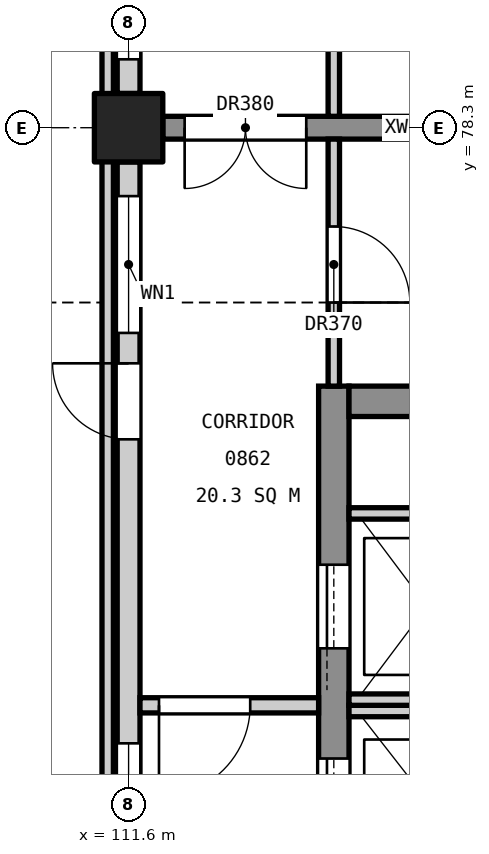
"""IFC4 building model, lengths in metres.
Left out: names, types, materials, properties, quantities, classifications, styles, units other than length and angle.
Written with IfcOpenShell. Run it as: python <this file> out.ifc"""

import sys

from ifc_helpers import new_model, si_unit, direction, frame, frame_2d, origin, origin_2d, place, context, subcontext, project, spatial, rectangle, extrude, element, fill, save


model = new_model("IFC4")
c1 = context("Model", 3, precision=1e-05, world=origin(), true_north=direction((0.0, 1.0)))
c2 = subcontext(c1, "Body", "Model", "MODEL_VIEW")
j1 = project(units=[si_unit("LENGTHUNIT", "METRE"), si_unit("PLANEANGLEUNIT", "RADIAN")], contexts=[c1])
p1 = place(None, origin())
s1 = spatial("IfcSite", under=j1, at=p1, CompositionType="ELEMENT")
p2 = place(p1, origin())
s2 = spatial("IfcBuilding", under=s1, at=p2, CompositionType="ELEMENT")
p3 = place(p2, frame((0.0, 0.0, 41.4)))
s3 = spatial("IfcBuildingStorey", under=s2, at=p3, CompositionType="ELEMENT", Elevation=41.4)
p4 = place(p3, frame((111.6, 78.3, 0.0), z_axis=(0.0, 0.0, 1.0), x_axis=(1.0, 0.0, 0.0)))
e1 = element("IfcColumn", 1, at=p4, inside=s3, PredefinedType="COLUMN", context=c2, shape_type="SweptSolid", body=[
    extrude(rectangle(XDim=0.9, YDim=0.9, at=origin_2d()), origin(), (0.0, 0.0, 1.0), 4.8),
])
p5 = place(p3, frame((114.3, 60.1, 0.0), z_axis=(0.0, 0.0, 1.0), x_axis=(0.0, 1.0, 0.0)))
e2 = element("IfcWall", 2, at=p5, inside=s3, PredefinedType="SHEAR", context=c2, shape_type="SweptSolid", body=[
    extrude(rectangle(XDim=14.8, YDim=0.4, at=frame_2d((7.4, 0.0))), origin(), (0.0, 0.0, 1.0), 4.55),
])
p6 = place(p5, frame((0.5, 0.0, 0.0)))
e3 = element("IfcOpeningElement", 3, at=p6, cuts=e2, PredefinedType="OPENING", context=c2, shape_type="SweptSolid", body=[
    extrude(rectangle(XDim=1.4, YDim=2.1, at=frame_2d((0.7, 1.05))), frame((0.0, 0.21, 0.0), z_axis=(0.0, -1.0, 0.0), x_axis=(1.0, 0.0, 0.0)), (0.0, 0.0, 1.0), 0.42),
])
p7 = place(p5, frame((8.8, 0.0, 0.0)))
e4 = element("IfcOpeningElement", 4, at=p7, cuts=e2, PredefinedType="OPENING", context=c2, shape_type="SweptSolid", body=[
    extrude(rectangle(XDim=1.1, YDim=2.1, at=frame_2d((0.55, 1.05))), frame((0.0, 0.21, 0.0), z_axis=(0.0, -1.0, 0.0), x_axis=(1.0, 0.0, 0.0)), (0.0, 0.0, 1.0), 0.42),
])
p8 = place(p5, frame((11.35, 0.0, 0.0)))
e5 = element("IfcOpeningElement", 5, at=p8, cuts=e2, PredefinedType="OPENING", context=c2, shape_type="SweptSolid", body=[
    extrude(rectangle(XDim=1.1, YDim=2.1, at=frame_2d((0.55, 1.05))), frame((0.0, 0.21, 0.0), z_axis=(0.0, -1.0, 0.0), x_axis=(1.0, 0.0, 0.0)), (0.0, 0.0, 1.0), 0.42),
])
p9 = place(p3, frame((118.6, 74.7, 0.0), z_axis=(0.0, 0.0, 1.0), x_axis=(-1.0, 0.0, 0.0)))
e6 = element("IfcWall", 6, at=p9, inside=s3, PredefinedType="SHEAR", context=c2, shape_type="SweptSolid", body=[
    extrude(rectangle(XDim=4.1, YDim=0.4, at=frame_2d((2.05, 0.0))), origin(), (0.0, 0.0, 1.0), 4.55),
])
p10 = place(p3, frame((118.35, 78.3, 0.0), z_axis=(0.0, 0.0, 1.0), x_axis=(-1.0, 0.0, 0.0)))
e7 = element("IfcWall", 7, at=p10, inside=s3, PredefinedType="SHEAR", context=c2, shape_type="SweptSolid", body=[
    extrude(rectangle(XDim=6.3, YDim=0.3, at=frame_2d((3.15, 0.0))), origin(), (0.0, 0.0, 1.0), 4.55),
])
p11 = place(p10, frame((4.413, 0.0, 0.0)))
e8 = element("IfcOpeningElement", 8, at=p11, cuts=e7, PredefinedType="OPENING", context=c2, shape_type="SweptSolid", body=[
    extrude(rectangle(XDim=1.6, YDim=2.1, at=frame_2d((0.8, 1.05))), frame((0.0, 0.16, 0.0), z_axis=(0.0, -1.0, 0.0), x_axis=(1.0, 0.0, 0.0)), (0.0, 0.0, 1.0), 0.32),
])
p12 = place(p3, frame((116.35, 70.625, 0.0), z_axis=(0.0, 0.0, 1.0), x_axis=(-1.0, 0.0, 0.0)))
e9 = element("IfcWall", 9, at=p12, inside=s3, PredefinedType="SOLIDWALL", context=c2, shape_type="SweptSolid", body=[
    extrude(rectangle(XDim=1.85, YDim=0.15, at=frame_2d((0.925, 0.0))), origin(), (0.0, 0.0, 1.0), 4.8),
])
for number, where, z_axis, x_axis in (
    (10, (116.35, 70.775, 0.0), (0.0, 0.0, 1.0), (-1.0, 0.0, 0.0)),
    (11, (116.35, 73.225, 0.0), (0.0, 0.0, 1.0), (-1.0, 0.0, 0.0)),
):
    element("IfcWall", number, at=place(p3, frame(where, z_axis=z_axis, x_axis=x_axis)), inside=s3, PredefinedType="SOLIDWALL", context=c2, shape_type="SweptSolid", body=[
        extrude(rectangle(XDim=1.85, YDim=0.15, at=frame_2d((0.925, 0.0))), origin(), (0.0, 0.0, 1.0), 4.55),
    ])
p13 = place(p3, frame((111.325, 35.05, 0.0), z_axis=(0.0, 0.0, 1.0), x_axis=(0.0, 1.0, 0.0)))
e12 = element("IfcWall", 12, at=p13, inside=s3, PredefinedType="PARAPET", context=c2, shape_type="SweptSolid", body=[
    extrude(rectangle(XDim=64.9, YDim=0.15, at=frame_2d((32.45, 0.0))), origin(), (0.0, 0.0, 1.0), 0.3),
])
p14 = place(p3, frame((111.6, 67.95, 0.0), z_axis=(0.0, 0.0, 1.0), x_axis=(0.0, 1.0, 0.0)))
e13 = element("IfcWall", 13, at=p14, inside=s3, PredefinedType="STANDARD", context=c2, shape_type="SweptSolid", body=[
    extrude(rectangle(XDim=9.9, YDim=0.3, at=frame_2d((4.95, 0.0))), origin(), (0.0, 0.0, 1.0), 3.55),
])
p15 = place(p14, frame((0.45, 0.0, 0.9)))
e14 = element("IfcOpeningElement", 14, at=p15, cuts=e13, PredefinedType="OPENING", context=c2, shape_type="SweptSolid", body=[
    extrude(rectangle(XDim=1.8, YDim=2.4, at=frame_2d((0.9, 1.2))), frame((0.0, 0.16, 0.0), z_axis=(0.0, -1.0, 0.0), x_axis=(1.0, 0.0, 0.0)), (0.0, 0.0, 1.0), 0.32),
])
p16 = place(p14, frame((7.65, 0.0, 0.9)))
e15 = element("IfcOpeningElement", 15, at=p16, cuts=e13, PredefinedType="OPENING", context=c2, shape_type="SweptSolid", body=[
    extrude(rectangle(XDim=1.8, YDim=2.4, at=frame_2d((0.9, 1.2))), frame((0.0, 0.16, 0.0), z_axis=(0.0, -1.0, 0.0), x_axis=(1.0, 0.0, 0.0)), (0.0, 0.0, 1.0), 0.32),
])
p17 = place(p14, frame((6.25, 0.0, 0.0)))
e16 = element("IfcOpeningElement", 16, at=p17, cuts=e13, PredefinedType="OPENING", context=c2, shape_type="SweptSolid", body=[
    extrude(rectangle(XDim=1.0, YDim=2.1, at=frame_2d((0.5, 1.05))), frame((0.0, 0.16, 0.0), z_axis=(0.0, -1.0, 0.0), x_axis=(1.0, 0.0, 0.0)), (0.0, 0.0, 1.0), 0.32),
])
p18 = place(p3, frame((111.6, 78.75, 0.0), z_axis=(0.0, 0.0, 1.0), x_axis=(0.0, 1.0, 0.0)))
e17 = element("IfcWall", 17, at=p18, inside=s3, PredefinedType="STANDARD", context=c2, shape_type="SweptSolid", body=[
    extrude(rectangle(XDim=9.9, YDim=0.3, at=frame_2d((4.95, 0.0))), origin(), (0.0, 0.0, 1.0), 3.55),
])
p19 = place(p18, frame((0.45, 0.0, 0.9)))
e18 = element("IfcOpeningElement", 18, at=p19, cuts=e17, PredefinedType="OPENING", context=c2, shape_type="SweptSolid", body=[
    extrude(rectangle(XDim=1.8, YDim=2.4, at=frame_2d((0.9, 1.2))), frame((0.0, 0.16, 0.0), z_axis=(0.0, -1.0, 0.0), x_axis=(1.0, 0.0, 0.0)), (0.0, 0.0, 1.0), 0.32),
])
p20 = place(p18, frame((4.05, 0.0, 0.9)))
e19 = element("IfcOpeningElement", 19, at=p20, cuts=e17, PredefinedType="OPENING", context=c2, shape_type="SweptSolid", body=[
    extrude(rectangle(XDim=1.8, YDim=2.4, at=frame_2d((0.9, 1.2))), frame((0.0, 0.16, 0.0), z_axis=(0.0, -1.0, 0.0), x_axis=(1.0, 0.0, 0.0)), (0.0, 0.0, 1.0), 0.32),
])
p21 = place(p18, frame((7.65, 0.0, 0.9)))
e20 = element("IfcOpeningElement", 20, at=p21, cuts=e17, PredefinedType="OPENING", context=c2, shape_type="SweptSolid", body=[
    extrude(rectangle(XDim=1.8, YDim=2.4, at=frame_2d((0.9, 1.2))), frame((0.0, 0.16, 0.0), z_axis=(0.0, -1.0, 0.0), x_axis=(1.0, 0.0, 0.0)), (0.0, 0.0, 1.0), 0.32),
])
p22 = place(p3, frame((114.3, 74.9, 0.0), z_axis=(0.0, 0.0, 1.0), x_axis=(0.0, 1.0, 0.0)))
e21 = element("IfcWall", 21, at=p22, inside=s3, PredefinedType="PARTITIONING", context=c2, shape_type="SweptSolid", body=[
    extrude(rectangle(XDim=3.25, YDim=0.15, at=frame_2d((1.625, 0.0))), origin(), (0.0, 0.0, 1.0), 3.55),
])
p23 = place(p22, frame((1.1, 0.0, 0.0)))
e22 = element("IfcOpeningElement", 22, at=p23, cuts=e21, PredefinedType="OPENING", context=c2, shape_type="SweptSolid", body=[
    extrude(rectangle(XDim=1.0, YDim=2.1, at=frame_2d((0.5, 1.05))), frame((0.0, 0.085, 0.0), z_axis=(0.0, -1.0, 0.0), x_axis=(1.0, 0.0, 0.0)), (0.0, 0.0, 1.0), 0.17),
])
p24 = place(p3, frame((114.3, 78.45, 0.0), z_axis=(0.0, 0.0, 1.0), x_axis=(0.0, 1.0, 0.0)))
e23 = element("IfcWall", 23, at=p24, inside=s3, PredefinedType="PARTITIONING", context=c2, shape_type="SweptSolid", body=[
    extrude(rectangle(XDim=10.45, YDim=0.15, at=frame_2d((5.225, 0.0))), origin(), (0.0, 0.0, 1.0), 3.55),
])
p25 = place(p24, frame((1.15, 0.0, 0.0)))
e24 = element("IfcOpeningElement", 24, at=p25, cuts=e23, PredefinedType="OPENING", context=c2, shape_type="SweptSolid", body=[
    extrude(rectangle(XDim=1.0, YDim=2.1, at=frame_2d((0.5, 1.05))), frame((0.0, 0.085, 0.0), z_axis=(0.0, -1.0, 0.0), x_axis=(1.0, 0.0, 0.0)), (0.0, 0.0, 1.0), 0.17),
])
p26 = place(p24, frame((4.75, 0.0, 0.0)))
e25 = element("IfcOpeningElement", 25, at=p26, cuts=e23, PredefinedType="OPENING", context=c2, shape_type="SweptSolid", body=[
    extrude(rectangle(XDim=1.0, YDim=2.1, at=frame_2d((0.5, 1.05))), frame((0.0, 0.085, 0.0), z_axis=(0.0, -1.0, 0.0), x_axis=(1.0, 0.0, 0.0)), (0.0, 0.0, 1.0), 0.17),
])
p27 = place(p24, frame((8.35, 0.0, 0.0)))
e26 = element("IfcOpeningElement", 26, at=p27, cuts=e23, PredefinedType="OPENING", context=c2, shape_type="SweptSolid", body=[
    extrude(rectangle(XDim=1.0, YDim=2.1, at=frame_2d((0.5, 1.05))), frame((0.0, 0.085, 0.0), z_axis=(0.0, -1.0, 0.0), x_axis=(1.0, 0.0, 0.0)), (0.0, 0.0, 1.0), 0.17),
])
p28 = place(p3, frame((114.1, 70.7, 0.0), z_axis=(0.0, 0.0, 1.0), x_axis=(-1.0, 0.0, 0.0)))
e27 = element("IfcWall", 27, at=p28, inside=s3, PredefinedType="PARTITIONING", context=c2, shape_type="SweptSolid", body=[
    extrude(rectangle(XDim=2.35, YDim=0.2, at=frame_2d((1.175, 0.0))), origin(), (0.0, 0.0, 1.0), 3.55),
])
p29 = place(p28, frame((0.9, 0.0, 0.0)))
e28 = element("IfcOpeningElement", 28, at=p29, cuts=e27, PredefinedType="OPENING", context=c2, shape_type="SweptSolid", body=[
    extrude(rectangle(XDim=1.2, YDim=2.1, at=frame_2d((0.6, 1.05))), frame((0.0, 0.11, 0.0), z_axis=(0.0, -1.0, 0.0), x_axis=(1.0, 0.0, 0.0)), (0.0, 0.0, 1.0), 0.22),
])
p30 = place(p7, origin())
e29 = element("IfcDoor", 29, at=p30, inside=s3, OperationType="SLIDING_TO_LEFT", PredefinedType="DOOR", context=c2, shape_type="SweptSolid", body=[
    extrude(rectangle(XDim=1.1, YDim=2.1, at=frame_2d((0.55, 1.05))), frame((0.0, 0.025, 0.0), z_axis=(0.0, -1.0, 0.0), x_axis=(1.0, 0.0, 0.0)), (0.0, 0.0, 1.0), 0.05),
])
fill(e4, e29)
p31 = place(p8, origin())
e30 = element("IfcDoor", 30, at=p31, inside=s3, OperationType="SLIDING_TO_LEFT", PredefinedType="DOOR", context=c2, shape_type="SweptSolid", body=[
    extrude(rectangle(XDim=1.1, YDim=2.1, at=frame_2d((0.55, 1.05))), frame((0.0, 0.025, 0.0), z_axis=(0.0, -1.0, 0.0), x_axis=(1.0, 0.0, 0.0)), (0.0, 0.0, 1.0), 0.05),
])
fill(e5, e30)
p32 = place(p15, origin())
e31 = element("IfcWindow", 31, at=p32, inside=s3, PartitioningType="SINGLE_PANEL", PredefinedType="WINDOW", context=c2, shape_type="SweptSolid", body=[
    extrude(rectangle(XDim=1.8, YDim=2.4, at=frame_2d((0.9, 1.2))), frame((0.0, 0.03, 0.0), z_axis=(0.0, -1.0, 0.0), x_axis=(1.0, 0.0, 0.0)), (0.0, 0.0, 1.0), 0.06),
])
fill(e14, e31)
p33 = place(p16, origin())
e32 = element("IfcWindow", 32, at=p33, inside=s3, PartitioningType="SINGLE_PANEL", PredefinedType="WINDOW", context=c2, shape_type="SweptSolid", body=[
    extrude(rectangle(XDim=1.8, YDim=2.4, at=frame_2d((0.9, 1.2))), frame((0.0, 0.03, 0.0), z_axis=(0.0, -1.0, 0.0), x_axis=(1.0, 0.0, 0.0)), (0.0, 0.0, 1.0), 0.06),
])
fill(e15, e32)
p34 = place(p19, origin())
e33 = element("IfcWindow", 33, at=p34, inside=s3, PartitioningType="SINGLE_PANEL", PredefinedType="WINDOW", context=c2, shape_type="SweptSolid", body=[
    extrude(rectangle(XDim=1.8, YDim=2.4, at=frame_2d((0.9, 1.2))), frame((0.0, 0.03, 0.0), z_axis=(0.0, -1.0, 0.0), x_axis=(1.0, 0.0, 0.0)), (0.0, 0.0, 1.0), 0.06),
])
fill(e18, e33)
p35 = place(p17, origin())
e34 = element("IfcDoor", 34, at=p35, inside=s3, OperationType="SINGLE_SWING_RIGHT", PredefinedType="DOOR", context=c2, shape_type="SweptSolid", body=[
    extrude(rectangle(XDim=1.0, YDim=2.1, at=frame_2d((0.5, 1.05))), frame((0.0, 0.025, 0.0), z_axis=(0.0, -1.0, 0.0), x_axis=(1.0, 0.0, 0.0)), (0.0, 0.0, 1.0), 0.05),
])
fill(e16, e34)
p36 = place(p23, frame((1.0, 0.0, 0.0), z_axis=(0.0, 0.0, 1.0), x_axis=(-1.0, 0.0, 0.0)))
e35 = element("IfcDoor", 35, at=p36, inside=s3, OperationType="SINGLE_SWING_RIGHT", PredefinedType="DOOR", context=c2, shape_type="SweptSolid", body=[
    extrude(rectangle(XDim=1.0, YDim=2.1, at=frame_2d((0.5, 1.05))), frame((0.0, 0.025, 0.0), z_axis=(0.0, -1.0, 0.0), x_axis=(1.0, 0.0, 0.0)), (0.0, 0.0, 1.0), 0.05),
])
fill(e22, e35)
p37 = place(p29, origin())
e36 = element("IfcDoor", 36, at=p37, inside=s3, OperationType="SINGLE_SWING_RIGHT", PredefinedType="DOOR", context=c2, shape_type="SweptSolid", body=[
    extrude(rectangle(XDim=1.2, YDim=2.1, at=frame_2d((0.6, 1.05))), frame((0.0, 0.025, 0.0), z_axis=(0.0, -1.0, 0.0), x_axis=(1.0, 0.0, 0.0)), (0.0, 0.0, 1.0), 0.05),
])
fill(e28, e36)
p38 = place(p11, origin())
e37 = element("IfcDoor", 37, at=p38, inside=s3, OperationType="DOUBLE_DOOR_SINGLE_SWING", PredefinedType="DOOR", context=c2, shape_type="SweptSolid", body=[
    extrude(rectangle(XDim=1.6, YDim=2.1, at=frame_2d((0.8, 1.05))), frame((0.0, 0.025, 0.0), z_axis=(0.0, -1.0, 0.0), x_axis=(1.0, 0.0, 0.0)), (0.0, 0.0, 1.0), 0.05),
])
fill(e8, e37)
save(model, sys.argv[1])
